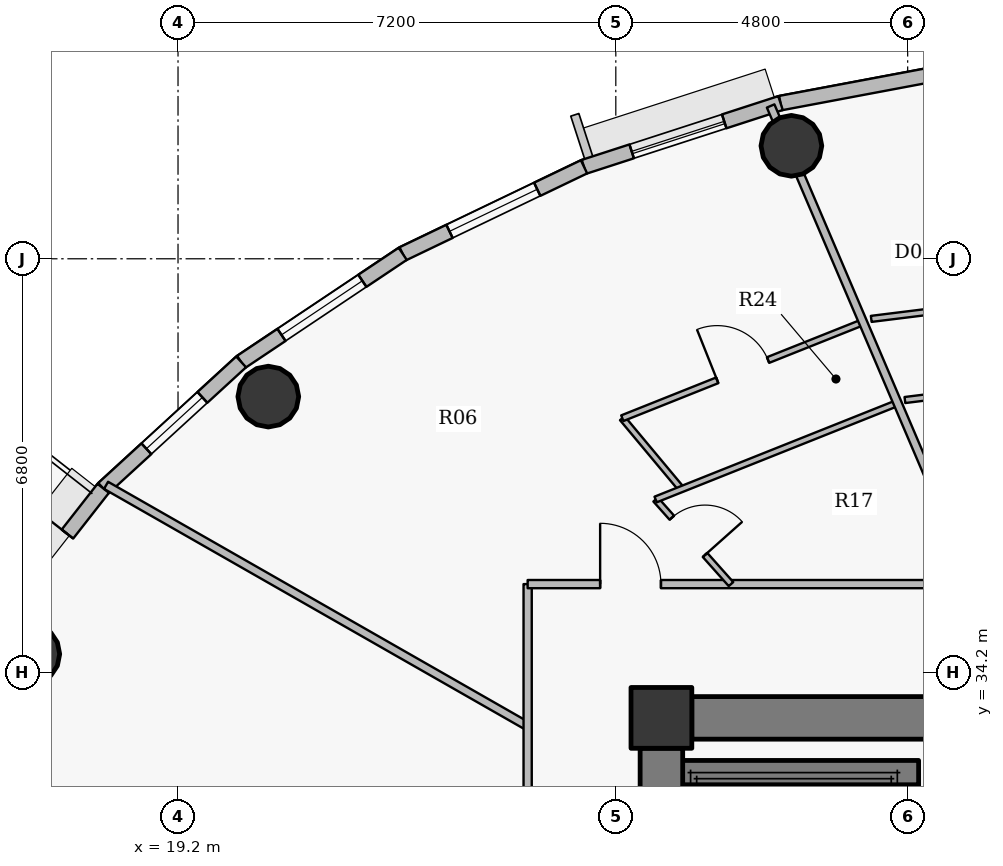
"""IFC4 building model, lengths in metres.
Left out: names, types, materials, properties, quantities, classifications, styles, units other than length and angle.
Written with IfcOpenShell. Run it as: python <this file> out.ifc"""

import sys

from ifc_helpers import new_model, si_unit, direction, frame, frame_2d, origin, origin_2d, place, context, subcontext, project, spatial, rectangle, hollow_circle, extrude, source, transform, mapped, element, fill, save


model = new_model("IFC4")
c1 = context("Model", 3, precision=1e-05, world=origin(), true_north=direction((0.0, 1.0)))
c2 = subcontext(c1, "Body", "Model", "MODEL_VIEW")
j1 = project(units=[si_unit("LENGTHUNIT", "METRE"), si_unit("PLANEANGLEUNIT", "RADIAN")], contexts=[c1])
p1 = place(None, origin())
s1 = spatial("IfcSite", under=j1, at=p1, CompositionType="ELEMENT")
p2 = place(p1, origin())
s2 = spatial("IfcBuilding", under=s1, at=p2, CompositionType="ELEMENT")
p3 = place(p2, frame((0.0, 0.0, 299.25)))
s3 = spatial("IfcBuildingStorey", under=s2, at=p3, CompositionType="ELEMENT", Elevation=299.25)
p4 = place(p3, frame((27.15, 33.45, 0.0), z_axis=(0.0, 0.0, 1.0), x_axis=(1.0, 0.0, 0.0)))
e1 = element("IfcColumn", 1, at=p4, inside=s3, PredefinedType="COLUMN", context=c2, shape_type="SweptSolid", body=[
    extrude(rectangle(XDim=1.0, YDim=1.0, at=origin_2d()), origin(), (0.0, 0.0, 1.0), 3.75),
])
p5 = place(p3, frame((31.18, 27.8, 0.0), z_axis=(0.0, 0.0, 1.0), x_axis=(0.0, 1.0, 0.0)))
e2 = element("IfcWall", 2, at=p5, inside=s3, PredefinedType="SHEAR", context=c2, shape_type="SweptSolid", body=[
    extrude(rectangle(XDim=4.75, YDim=0.4, at=frame_2d((2.375, 0.0))), origin(), (0.0, 0.0, 1.0), 3.75),
])
p6 = place(p3, frame((27.25, 32.55, 0.0), z_axis=(0.0, 0.0, 1.0), x_axis=(1.0, 0.0, 0.0)))
e3 = element("IfcWall", 3, at=p6, inside=s3, PredefinedType="SHEAR", context=c2, shape_type="SweptSolid", body=[
    extrude(rectangle(XDim=4.13, YDim=0.4, at=frame_2d((2.065, 0.0))), origin(), (0.0, 0.0, 1.0), 3.75),
])
p7 = place(p3, frame((27.65, 33.45, 0.0), z_axis=(0.0, 0.0, 1.0), x_axis=(1.0, 0.0, 0.0)))
e4 = element("IfcWall", 4, at=p7, inside=s3, PredefinedType="SHEAR", context=c2, shape_type="SweptSolid", body=[
    extrude(rectangle(XDim=16.7, YDim=0.7, at=frame_2d((8.35, 0.0))), origin(), (0.0, 0.0, 1.0), 3.05),
])
p8 = place(p7, frame((12.775, 0.0, 0.0)))
e5 = element("IfcOpeningElement", 5, at=p8, cuts=e4, PredefinedType="OPENING", context=c2, shape_type="SweptSolid", body=[
    extrude(rectangle(XDim=1.15, YDim=2.15, at=origin_2d()), frame((0.575, 0.36, 1.075), z_axis=(0.0, -1.0, 0.0), x_axis=(1.0, 0.0, 0.0)), (0.0, 0.0, 1.0), 0.72),
])
p9 = place(p3, frame((27.15, 21.05, 0.0), z_axis=(0.0, 0.0, 1.0), x_axis=(0.0, 1.0, 0.0)))
e6 = element("IfcWall", 6, at=p9, inside=s3, PredefinedType="SHEAR", context=c2, shape_type="SweptSolid", body=[
    extrude(rectangle(XDim=11.9, YDim=0.7, at=frame_2d((5.95, 0.0))), origin(), (0.0, 0.0, 1.0), 3.05),
])
for number, where, z_axis, x_axis in (
    (7, (29.288, 42.858, 0.0), (0.0, 0.0, 1.0), (1.0, 0.0, 0.0)),
    (8, (20.685, 38.733, 0.0), (0.0, 0.0, 1.0), (1.0, 0.0, 0.0)),
    (9, (16.754, 34.5, 0.0), (0.0, 0.0, 1.0), (1.0, 0.0, 0.0)),
):
    element("IfcColumn", number, at=place(p3, frame(where, z_axis=z_axis, x_axis=x_axis)), inside=s3, PredefinedType="COLUMN", context=c2, shape_type="SweptSolid", body=[
        extrude(hollow_circle(Radius=0.5, WallThickness=0.032, at=origin_2d()), origin(), (0.0, 0.0, 1.0), 3.75),
    ])
p10 = place(p3, frame((29.109, 43.56, 0.0), z_axis=(0.0, 0.0, 1.0), x_axis=(0.982782655757, 0.184765395959, 0.0)))
e10 = element("IfcWall", 10, at=p10, inside=s3, PredefinedType="SOLIDWALL", context=c2, shape_type="SweptSolid", body=[
    extrude(rectangle(XDim=3.462, YDim=0.24, at=frame_2d((1.731, 0.0))), origin(), (0.0, 0.0, 1.0), 3.5),
])
p11 = place(p3, frame((25.877, 42.512, 0.0), z_axis=(0.0, 0.0, 1.0), x_axis=(0.95123136723, 0.308478339592, 0.0)))
e11 = element("IfcWall", 11, at=p11, inside=s3, PredefinedType="SOLIDWALL", context=c2, shape_type="SweptSolid", body=[
    extrude(rectangle(XDim=3.398, YDim=0.24, at=frame_2d((1.699, 0.0))), origin(), (0.0, 0.0, 1.0), 3.5),
])
p12 = place(p11, frame((0.824, 0.0, 0.9)))
e12 = element("IfcOpeningElement", 12, at=p12, cuts=e11, PredefinedType="OPENING", context=c2, shape_type="SweptSolid", body=[
    extrude(rectangle(XDim=1.6, YDim=1.75, at=origin_2d()), frame((0.8, 0.13, 0.875), z_axis=(0.0, -1.0, 0.0), x_axis=(1.0, 0.0, 0.0)), (0.0, 0.0, 1.0), 0.26),
])
p13 = place(p3, frame((22.896, 41.082, 0.0), z_axis=(0.0, 0.0, 1.0), x_axis=(0.901573741254, 0.43262546051, 0.0)))
e13 = element("IfcWall", 13, at=p13, inside=s3, PredefinedType="SOLIDWALL", context=c2, shape_type="SweptSolid", body=[
    extrude(rectangle(XDim=3.307, YDim=0.24, at=frame_2d((1.653, 0.0))), origin(), (0.0, 0.0, 1.0), 3.5),
])
p14 = place(p13, frame((0.854, 0.0, 0.9)))
e14 = element("IfcOpeningElement", 14, at=p14, cuts=e13, PredefinedType="OPENING", context=c2, shape_type="SweptSolid", body=[
    extrude(rectangle(XDim=1.6, YDim=1.75, at=origin_2d()), frame((0.8, 0.13, 0.875), z_axis=(0.0, -1.0, 0.0), x_axis=(1.0, 0.0, 0.0)), (0.0, 0.0, 1.0), 0.26),
])
p15 = place(p3, frame((20.238, 39.304, 0.0), z_axis=(0.0, 0.0, 1.0), x_axis=(0.831250592635, 0.55589787933, 0.0)))
e15 = element("IfcWall", 15, at=p15, inside=s3, PredefinedType="SOLIDWALL", context=c2, shape_type="SweptSolid", body=[
    extrude(rectangle(XDim=3.197, YDim=0.24, at=frame_2d((1.599, 0.0))), origin(), (0.0, 0.0, 1.0), 3.5),
])
p16 = place(p15, frame((0.799, 0.0, 0.9)))
e16 = element("IfcOpeningElement", 16, at=p16, cuts=e15, PredefinedType="OPENING", context=c2, shape_type="SweptSolid", body=[
    extrude(rectangle(XDim=1.6, YDim=1.75, at=origin_2d()), frame((0.8, 0.13, 0.875), z_axis=(0.0, -1.0, 0.0), x_axis=(1.0, 0.0, 0.0)), (0.0, 0.0, 1.0), 0.26),
])
p17 = place(p3, frame((17.97, 37.225, 0.0), z_axis=(0.0, 0.0, 1.0), x_axis=(0.737068506972, 0.675818034703, 0.0)))
e17 = element("IfcWall", 17, at=p17, inside=s3, PredefinedType="SOLIDWALL", context=c2, shape_type="SweptSolid", body=[
    extrude(rectangle(XDim=3.077, YDim=0.24, at=frame_2d((1.539, 0.0))), origin(), (0.0, 0.0, 1.0), 3.5),
])
p18 = place(p17, frame((0.963, 0.0, 0.9)))
e18 = element("IfcOpeningElement", 18, at=p18, cuts=e17, PredefinedType="OPENING", context=c2, shape_type="SweptSolid", body=[
    extrude(rectangle(XDim=1.25, YDim=1.65, at=origin_2d()), frame((0.625, 0.13, 0.825), z_axis=(0.0, -1.0, 0.0), x_axis=(1.0, 0.0, 0.0)), (0.0, 0.0, 1.0), 0.26),
])
p19 = place(p3, frame((16.146, 34.895, 0.0), z_axis=(0.0, 0.0, 1.0), x_axis=(0.616337186556, 0.787482363275, 0.0)))
e19 = element("IfcWall", 19, at=p19, inside=s3, PredefinedType="SOLIDWALL", context=c2, shape_type="SweptSolid", body=[
    extrude(rectangle(XDim=2.958, YDim=0.24, at=frame_2d((1.479, 0.0))), origin(), (0.0, 0.0, 1.0), 3.5),
])
p20 = place(p19, frame((0.954, 0.0, 0.0)))
e20 = element("IfcOpeningElement", 20, at=p20, cuts=e19, PredefinedType="OPENING", context=c2, shape_type="SweptSolid", body=[
    extrude(rectangle(XDim=1.05, YDim=2.15, at=origin_2d()), frame((0.525, 0.13, 1.075), z_axis=(0.0, -1.0, 0.0), x_axis=(1.0, 0.0, 0.0)), (0.0, 0.0, 1.0), 0.26),
])
p21 = place(p3, frame((18.016, 37.274, 0.0), z_axis=(0.0, 0.0, 1.0), x_axis=(0.868277005727, -0.496079672357, 0.0)))
e21 = element("IfcWall", 21, at=p21, inside=s3, PredefinedType="PARTITIONING", context=c2, shape_type="SweptSolid", body=[
    extrude(rectangle(XDim=7.985, YDim=0.135, at=frame_2d((3.993, 0.0))), origin(), (0.0, 0.0, 1.0), 2.985),
])
p22 = place(p3, frame((24.95, 31.65, 0.0), z_axis=(0.0, 0.0, 1.0), x_axis=(0.0, 1.0, 0.0)))
e22 = element("IfcWall", 22, at=p22, inside=s3, PredefinedType="PARTITIONING", context=c2, shape_type="SweptSolid", body=[
    extrude(rectangle(XDim=4.0, YDim=0.135, at=frame_2d((2.0, 0.0))), origin(), (0.0, 0.0, 1.0), 3.035),
])
p23 = place(p3, frame((24.95, 35.65, 0.0), z_axis=(0.0, 0.0, 1.0), x_axis=(1.0, 0.0, 0.0)))
e23 = element("IfcWall", 23, at=p23, inside=s3, PredefinedType="PARTITIONING", context=c2, shape_type="SweptSolid", body=[
    extrude(rectangle(XDim=10.1, YDim=0.135, at=frame_2d((5.05, 0.0))), origin(), (0.0, 0.0, 1.0), 3.035),
])
p24 = place(p23, frame((1.192, 0.0, 0.0)))
e24 = element("IfcOpeningElement", 24, at=p24, cuts=e23, PredefinedType="OPENING", context=c2, shape_type="SweptSolid", body=[
    extrude(rectangle(XDim=1.0, YDim=2.15, at=origin_2d()), frame((0.5, 0.078, 1.075), z_axis=(0.0, -1.0, 0.0), x_axis=(1.0, 0.0, 0.0)), (0.0, 0.0, 1.0), 0.155),
])
p25 = place(p3, frame((26.507, 38.378, 0.0), z_axis=(0.0, 0.0, 1.0), x_axis=(0.640626707989, -0.767852473468, 0.0)))
e25 = element("IfcWall", 25, at=p25, inside=s3, PredefinedType="PARTITIONING", context=c2, shape_type="SweptSolid", body=[
    extrude(rectangle(XDim=1.52, YDim=0.1, at=frame_2d((0.76, 0.0))), origin(), (0.0, 0.0, 1.0), 3.5),
])
p26 = place(p3, frame((26.507, 38.378, 0.0), z_axis=(0.0, 0.0, 1.0), x_axis=(0.928788495711, 0.370610213345, 0.0)))
e26 = element("IfcWall", 26, at=p26, inside=s3, PredefinedType="PARTITIONING", context=c2, shape_type="SweptSolid", body=[
    extrude(rectangle(XDim=4.261, YDim=0.1, at=frame_2d((2.131, 0.0))), origin(), (0.0, 0.0, 1.0), 3.035),
])
p27 = place(p26, frame((1.681, 0.0, 0.0)))
e27 = element("IfcOpeningElement", 27, at=p27, cuts=e26, PredefinedType="OPENING", context=c2, shape_type="SweptSolid", body=[
    extrude(rectangle(XDim=0.9, YDim=2.1, at=origin_2d()), frame((0.45, 0.06, 1.05), z_axis=(0.0, -1.0, 0.0), x_axis=(1.0, 0.0, 0.0)), (0.0, 0.0, 1.0), 0.12),
])
p28 = place(p3, frame((27.055, 37.042, 0.0), z_axis=(0.0, 0.0, 1.0), x_axis=(0.665119722178, -0.746736737525, 0.0)))
e28 = element("IfcWall", 28, at=p28, inside=s3, PredefinedType="PARTITIONING", context=c2, shape_type="SweptSolid", body=[
    extrude(rectangle(XDim=1.864, YDim=0.1, at=frame_2d((0.932, 0.0))), origin(), (0.0, 0.0, 1.0), 3.5),
])
p29 = place(p28, frame((0.401, 0.0, 0.0)))
e29 = element("IfcOpeningElement", 29, at=p29, cuts=e28, PredefinedType="OPENING", context=c2, shape_type="SweptSolid", body=[
    extrude(rectangle(XDim=0.82, YDim=2.1, at=origin_2d()), frame((0.41, 0.06, 1.05), z_axis=(0.0, -1.0, 0.0), x_axis=(1.0, 0.0, 0.0)), (0.0, 0.0, 1.0), 0.12),
])
p30 = place(p3, frame((27.055, 37.042, 0.0), z_axis=(0.0, 0.0, 1.0), x_axis=(0.928814416372, 0.370545246819, 0.0)))
e30 = element("IfcWall", 30, at=p30, inside=s3, PredefinedType="PARTITIONING", context=c2, shape_type="SweptSolid", body=[
    extrude(rectangle(XDim=4.283, YDim=0.1, at=frame_2d((2.141, 0.0))), origin(), (0.0, 0.0, 1.0), 3.035),
])
p31 = place(p3, frame((28.946, 43.513, 0.0), z_axis=(0.0, 0.0, 1.0), x_axis=(0.392833513872, -0.919609607594, 0.0)))
e31 = element("IfcWall", 31, at=p31, inside=s3, PredefinedType="PARTITIONING", context=c2, shape_type="SweptSolid", body=[
    extrude(rectangle(XDim=8.55, YDim=0.135, at=frame_2d((4.275, 0.0))), origin(), (0.0, 0.0, 1.0), 3.035),
])
p32 = place(p3, frame((30.601, 40.011, 0.0), z_axis=(0.0, 0.0, 1.0), x_axis=(0.992391758007, 0.123120260886, 0.0)))
e32 = element("IfcWall", 32, at=p32, inside=s3, PredefinedType="PARTITIONING", context=c2, shape_type="SweptSolid", body=[
    extrude(rectangle(XDim=3.91, YDim=0.1, at=frame_2d((1.955, 0.0))), origin(), (0.0, 0.0, 1.0), 3.035),
])
p33 = place(p32, frame((1.505, 0.0, 0.0)))
e33 = element("IfcOpeningElement", 33, at=p33, cuts=e32, PredefinedType="OPENING", context=c2, shape_type="SweptSolid", body=[
    extrude(rectangle(XDim=0.9, YDim=2.1, at=origin_2d()), frame((0.45, 0.06, 1.05), z_axis=(0.0, -1.0, 0.0), x_axis=(1.0, 0.0, 0.0)), (0.0, 0.0, 1.0), 0.12),
])
p34 = place(p3, frame((31.155, 38.677, 0.0), z_axis=(0.0, 0.0, 1.0), x_axis=(0.992398620659, 0.123064932921, 0.0)))
e34 = element("IfcWall", 34, at=p34, inside=s3, PredefinedType="PARTITIONING", context=c2, shape_type="SweptSolid", body=[
    extrude(rectangle(XDim=3.904, YDim=0.1, at=frame_2d((1.952, 0.0))), origin(), (0.0, 0.0, 1.0), 3.035),
])
p35 = place(p3, frame((27.64, 33.8, 0.0), z_axis=(0.0, 0.0, 1.0), x_axis=(-1.0, 0.0, 0.0)))
e35 = element("IfcWall", 35, at=p35, inside=s3, PredefinedType="PARTITIONING", context=c2, shape_type="SweptSolid", body=[
    extrude(rectangle(XDim=0.84, YDim=0.135, at=frame_2d((0.42, 0.0))), origin(), (0.0, 0.0, 1.0), 3.035),
])
p36 = place(p3, frame((26.8, 33.492, 0.0), z_axis=(0.0, 0.0, 1.0), x_axis=(0.0, -1.0, 0.0)))
e36 = element("IfcWall", 36, at=p36, inside=s3, PredefinedType="PARTITIONING", context=c2, shape_type="SweptSolid", body=[
    extrude(rectangle(XDim=0.532, YDim=0.135, at=frame_2d((0.266, 0.0))), origin(), (0.0, 0.0, 1.0), 3.5),
])
m1 = source(origin(), c2, "Body", "SweptSolid", [
    extrude(rectangle(XDim=1.6, YDim=1.75, at=origin_2d()), frame((0.8, 0.03, 0.875), z_axis=(0.0, -1.0, 0.0), x_axis=(1.0, 0.0, 0.0)), (0.0, 0.0, 1.0), 0.06),
])
p37 = place(p12, origin())
e37 = element("IfcWindow", 37, at=p37, inside=s3, PartitioningType="DOUBLE_PANEL_VERTICAL", PredefinedType="WINDOW", context=c2, shape_type="MappedRepresentation", body=[
    mapped(m1, transform((0.0, 0.0, 0.0), x_axis=(1.0, 0.0, 0.0), y_axis=(0.0, 1.0, 0.0), z_axis=(0.0, 0.0, 1.0), scale=1.0)),
])
fill(e12, e37)
p38 = place(p14, origin())
e38 = element("IfcWindow", 38, at=p38, inside=s3, PartitioningType="DOUBLE_PANEL_VERTICAL", PredefinedType="WINDOW", context=c2, shape_type="MappedRepresentation", body=[
    mapped(m1, transform((0.0, 0.0, 0.0), x_axis=(1.0, 0.0, 0.0), y_axis=(0.0, 1.0, 0.0), z_axis=(0.0, 0.0, 1.0), scale=1.0)),
])
fill(e14, e38)
p39 = place(p16, origin())
e39 = element("IfcWindow", 39, at=p39, inside=s3, PartitioningType="DOUBLE_PANEL_VERTICAL", PredefinedType="WINDOW", context=c2, shape_type="MappedRepresentation", body=[
    mapped(m1, transform((0.0, 0.0, 0.0), x_axis=(1.0, 0.0, 0.0), y_axis=(0.0, 1.0, 0.0), z_axis=(0.0, 0.0, 1.0), scale=1.0)),
])
fill(e16, e39)
m2 = source(origin(), c2, "Body", "SweptSolid", [
    extrude(rectangle(XDim=1.25, YDim=1.65, at=origin_2d()), frame((0.625, 0.03, 0.825), z_axis=(0.0, -1.0, 0.0), x_axis=(1.0, 0.0, 0.0)), (0.0, 0.0, 1.0), 0.06),
])
p40 = place(p18, origin())
e40 = element("IfcWindow", 40, at=p40, inside=s3, PartitioningType="SINGLE_PANEL", PredefinedType="WINDOW", context=c2, shape_type="MappedRepresentation", body=[
    mapped(m2, transform((0.0, 0.0, 0.0), x_axis=(1.0, 0.0, 0.0), y_axis=(0.0, 1.0, 0.0), z_axis=(0.0, 0.0, 1.0), scale=1.0)),
])
fill(e18, e40)
m3 = source(origin(), c2, "Body", "SweptSolid", [
    extrude(rectangle(XDim=1.05, YDim=2.15, at=origin_2d()), frame((0.525, 0.025, 1.075), z_axis=(0.0, -1.0, 0.0), x_axis=(1.0, 0.0, 0.0)), (0.0, 0.0, 1.0), 0.05),
])
p41 = place(p20, origin())
e41 = element("IfcDoor", 41, at=p41, inside=s3, OperationType="SINGLE_SWING_RIGHT", PredefinedType="DOOR", context=c2, shape_type="MappedRepresentation", body=[
    mapped(m3, transform((0.0, 0.0, 0.0), x_axis=(1.0, 0.0, 0.0), y_axis=(0.0, 1.0, 0.0), z_axis=(0.0, 0.0, 1.0), scale=1.0)),
])
fill(e20, e41)
m4 = source(origin(), c2, "Body", "SweptSolid", [
    extrude(rectangle(XDim=1.0, YDim=2.15, at=origin_2d()), frame((0.5, 0.025, 1.075), z_axis=(0.0, -1.0, 0.0), x_axis=(1.0, 0.0, 0.0)), (0.0, 0.0, 1.0), 0.05),
])
p42 = place(p24, origin())
e42 = element("IfcDoor", 42, at=p42, inside=s3, OperationType="SINGLE_SWING_LEFT", PredefinedType="DOOR", context=c2, shape_type="MappedRepresentation", body=[
    mapped(m4, transform((0.0, 0.0, 0.0), x_axis=(1.0, 0.0, 0.0), y_axis=(0.0, 1.0, 0.0), z_axis=(0.0, 0.0, 1.0), scale=1.0)),
])
fill(e24, e42)
m5 = source(origin(), c2, "Body", "SweptSolid", [
    extrude(rectangle(XDim=0.82, YDim=2.1, at=origin_2d()), frame((0.41, 0.025, 1.05), z_axis=(0.0, -1.0, 0.0), x_axis=(1.0, 0.0, 0.0)), (0.0, 0.0, 1.0), 0.05),
])
p43 = place(p29, origin())
e43 = element("IfcDoor", 43, at=p43, inside=s3, OperationType="SINGLE_SWING_RIGHT", PredefinedType="DOOR", context=c2, shape_type="MappedRepresentation", body=[
    mapped(m5, transform((0.0, 0.0, 0.0), x_axis=(1.0, 0.0, 0.0), y_axis=(0.0, 1.0, 0.0), z_axis=(0.0, 0.0, 1.0), scale=1.0)),
])
fill(e29, e43)
m6 = source(origin(), c2, "Body", "SweptSolid", [
    extrude(rectangle(XDim=0.9, YDim=2.1, at=origin_2d()), frame((0.45, 0.025, 1.05), z_axis=(0.0, -1.0, 0.0), x_axis=(1.0, 0.0, 0.0)), (0.0, 0.0, 1.0), 0.05),
])
p44 = place(p27, origin())
e44 = element("IfcDoor", 44, at=p44, inside=s3, OperationType="SINGLE_SWING_LEFT", PredefinedType="DOOR", context=c2, shape_type="MappedRepresentation", body=[
    mapped(m6, transform((0.0, 0.0, 0.0), x_axis=(1.0, 0.0, 0.0), y_axis=(0.0, 1.0, 0.0), z_axis=(0.0, 0.0, 1.0), scale=1.0)),
])
fill(e27, e44)
save(model, sys.argv[1])
